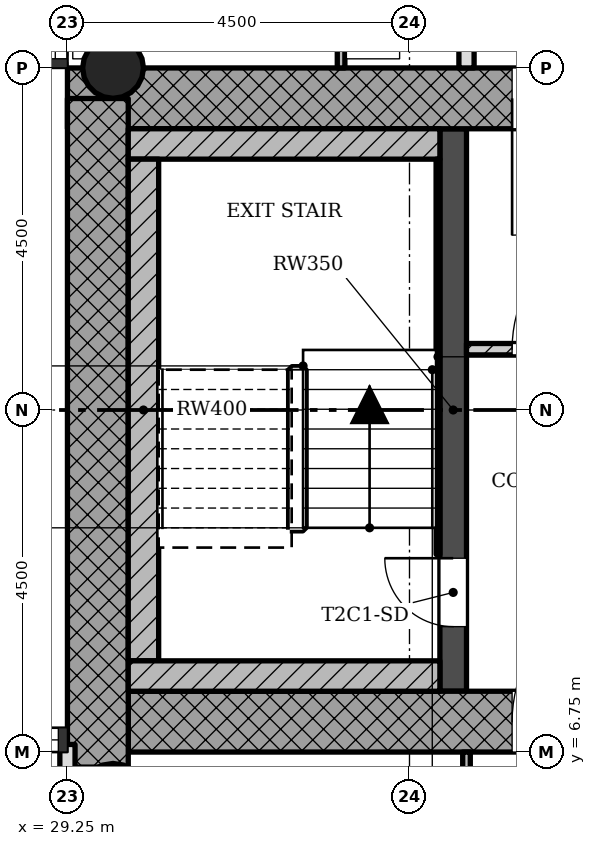
"""IFC4 building model, lengths in metres.
Left out: names, types, materials, properties, quantities, classifications, styles, units other than length and angle.
Written with IfcOpenShell. Run it as: python <this file> out.ifc"""

import sys

from ifc_helpers import new_model, si_unit, direction, frame, frame_2d, origin, origin_2d, place, context, subcontext, project, spatial, rectangle, hollow_circle, extrude, element, fill, save


model = new_model("IFC4")
c1 = context("Model", 3, precision=1e-05, world=origin(), true_north=direction((0.0, 1.0)))
c2 = subcontext(c1, "Body", "Model", "MODEL_VIEW")
j1 = project(units=[si_unit("LENGTHUNIT", "METRE"), si_unit("PLANEANGLEUNIT", "RADIAN")], contexts=[c1])
p1 = place(None, origin())
s1 = spatial("IfcSite", under=j1, at=p1, CompositionType="ELEMENT")
p2 = place(p1, origin())
s2 = spatial("IfcBuilding", under=s1, at=p2, CompositionType="ELEMENT")
p3 = place(p2, frame((0.0, 0.0, 171.1)))
s3 = spatial("IfcBuildingStorey", under=s2, at=p3, CompositionType="ELEMENT", Elevation=171.1)
p4 = place(p3, frame((30.05, 7.15, 0.0), z_axis=(0.0, 0.0, 1.0), x_axis=(1.0, 0.0, 0.0)))
e1 = element("IfcWall", 1, at=p4, inside=s3, PredefinedType="SHEAR", context=c2, shape_type="SweptSolid", body=[
    extrude(rectangle(XDim=12.7, YDim=0.8, at=frame_2d((6.35, 0.0))), origin(), (0.0, 0.0, 1.0), 3.4),
])
p5 = place(p4, frame((5.05, 0.0, 0.0)))
e2 = element("IfcOpeningElement", 2, at=p5, cuts=e1, PredefinedType="OPENING", context=c2, shape_type="SweptSolid", body=[
    extrude(rectangle(XDim=1.8, YDim=2.1, at=frame_2d((0.9, 1.05))), frame((0.0, 0.41, 0.0), z_axis=(0.0, -1.0, 0.0), x_axis=(1.0, 0.0, 0.0)), (0.0, 0.0, 1.0), 0.82),
])
p6 = place(p3, frame((41.95, 15.35, 0.0), z_axis=(0.0, 0.0, 1.0), x_axis=(-1.0, 0.0, 0.0)))
e3 = element("IfcWall", 3, at=p6, inside=s3, PredefinedType="SHEAR", context=c2, shape_type="SweptSolid", body=[
    extrude(rectangle(XDim=12.7, YDim=0.8, at=frame_2d((6.35, 0.0))), origin(), (0.0, 0.0, 1.0), 3.4),
])
p7 = place(p6, frame((5.05, 0.0, 0.0)))
e4 = element("IfcOpeningElement", 4, at=p7, cuts=e3, PredefinedType="OPENING", context=c2, shape_type="SweptSolid", body=[
    extrude(rectangle(XDim=1.8, YDim=2.1, at=frame_2d((0.9, 1.05))), frame((0.0, 0.41, 0.0), z_axis=(0.0, -1.0, 0.0), x_axis=(1.0, 0.0, 0.0)), (0.0, 0.0, 1.0), 0.82),
])
p8 = place(p3, frame((29.65, 15.348, 0.0), z_axis=(0.0, 0.0, 1.0), x_axis=(0.0, -1.0, 0.0)))
e5 = element("IfcWall", 5, at=p8, inside=s3, PredefinedType="SHEAR", context=c2, shape_type="SweptSolid", body=[
    extrude(rectangle(XDim=8.796, YDim=0.8, at=frame_2d((4.398, 0.0))), origin(), (0.0, 0.0, 1.0), 3.4),
])
p9 = place(p3, frame((34.325, 7.55, 0.0), z_axis=(0.0, 0.0, 1.0), x_axis=(0.0, 1.0, 0.0)))
e6 = element("IfcWall", 6, at=p9, inside=s3, PredefinedType="SHEAR", context=c2, shape_type="SweptSolid", body=[
    extrude(rectangle(XDim=7.4, YDim=0.35, at=frame_2d((3.7, 0.0))), origin(), (0.0, 0.0, 1.0), 3.4),
])
p10 = place(p9, frame((0.85, 0.0, 0.0)))
e7 = element("IfcOpeningElement", 7, at=p10, cuts=e6, PredefinedType="OPENING", context=c2, shape_type="SweptSolid", body=[
    extrude(rectangle(XDim=0.9, YDim=2.1, at=frame_2d((0.45, 1.05))), frame((0.0, 0.185, 0.0), z_axis=(0.0, -1.0, 0.0), x_axis=(1.0, 0.0, 0.0)), (0.0, 0.0, 1.0), 0.37),
])
p11 = place(p3, frame((29.85, 15.75, 0.0), z_axis=(0.0, 0.0, 1.0), x_axis=(1.0, 0.0, 0.0)))
e8 = element("IfcColumn", 8, at=p11, inside=s3, PredefinedType="COLUMN", context=c2, shape_type="SweptSolid", body=[
    extrude(hollow_circle(Radius=0.4, WallThickness=0.028, at=origin_2d()), origin(), (0.0, 0.0, 1.0), 3.4),
])
p12 = place(p3, frame((29.85, 6.15, 0.0), z_axis=(0.0, 0.0, 1.0), x_axis=(1.0, 0.0, 0.0)))
e9 = element("IfcColumn", 9, at=p12, inside=s3, PredefinedType="COLUMN", context=c2, shape_type="SweptSolid", body=[
    extrude(hollow_circle(Radius=0.45, WallThickness=0.032, at=origin_2d()), origin(), (0.0, 0.0, 1.0), 3.4),
])
p13 = place(p3, frame((37.5, 12.05, 0.0), z_axis=(0.0, 0.0, 1.0), x_axis=(-1.0, 0.0, 0.0)))
e10 = element("IfcWall", 10, at=p13, inside=s3, PredefinedType="PARTITIONING", context=c2, shape_type="SweptSolid", body=[
    extrude(rectangle(XDim=3.0, YDim=0.15, at=frame_2d((1.5, 0.0))), origin(), (0.0, 0.0, 1.0), 3.0),
])
p14 = place(p13, frame((0.6, 0.0, 0.0)))
e11 = element("IfcOpeningElement", 11, at=p14, cuts=e10, PredefinedType="OPENING", context=c2, shape_type="SweptSolid", body=[
    extrude(rectangle(XDim=1.8, YDim=2.1, at=frame_2d((0.9, 1.05))), frame((0.0, 0.085, 0.0), z_axis=(0.0, -1.0, 0.0), x_axis=(1.0, 0.0, 0.0)), (0.0, 0.0, 1.0), 0.17),
])
p15 = place(p3, frame((34.5, 4.5, 0.0), z_axis=(0.0, 0.0, 1.0), x_axis=(0.0, 1.0, 0.0)))
e12 = element("IfcWall", 12, at=p15, inside=s3, PredefinedType="PARTITIONING", context=c2, shape_type="SweptSolid", body=[
    extrude(rectangle(XDim=2.25, YDim=0.1, at=frame_2d((1.125, 0.0))), origin(), (0.0, 0.0, 1.0), 3.0),
])
p16 = place(p3, frame((34.5, 15.75, 0.0), z_axis=(0.0, 0.0, 1.0), x_axis=(0.0, 1.0, 0.0)))
e13 = element("IfcWall", 13, at=p16, inside=s3, PredefinedType="SOLIDWALL", context=c2, shape_type="SweptSolid", body=[
    extrude(rectangle(XDim=4.5, YDim=0.2, at=frame_2d((2.25, 0.0))), origin(), (0.0, 0.0, 1.0), 3.0),
])
p17 = place(p16, frame((3.0, 0.0, 0.0)))
e14 = element("IfcOpeningElement", 14, at=p17, cuts=e13, PredefinedType="OPENING", context=c2, shape_type="SweptSolid", body=[
    extrude(rectangle(XDim=0.9, YDim=2.1, at=frame_2d((0.45, 1.05))), frame((0.0, 0.11, 0.0), z_axis=(0.0, -1.0, 0.0), x_axis=(1.0, 0.0, 0.0)), (0.0, 0.0, 1.0), 0.22),
])
p18 = place(p3, frame((32.85, 15.75, 0.0), z_axis=(0.0, 0.0, 1.0), x_axis=(0.0, 1.0, 0.0)))
e15 = element("IfcWall", 15, at=p18, inside=s3, PredefinedType="PARTITIONING", context=c2, shape_type="SweptSolid", body=[
    extrude(rectangle(XDim=4.5, YDim=0.1, at=frame_2d((2.25, 0.0))), origin(), (0.0, 0.0, 1.0), 3.0),
])
p19 = place(p18, frame((3.0, 0.0, 0.0)))
e16 = element("IfcOpeningElement", 16, at=p19, cuts=e15, PredefinedType="OPENING", context=c2, shape_type="SweptSolid", body=[
    extrude(rectangle(XDim=0.9, YDim=2.1, at=frame_2d((0.45, 1.05))), frame((0.0, 0.06, 0.0), z_axis=(0.0, -1.0, 0.0), x_axis=(1.0, 0.0, 0.0)), (0.0, 0.0, 1.0), 0.12),
])
p20 = place(p3, frame((29.25, 0.9, 0.0), z_axis=(0.0, 0.0, 1.0), x_axis=(0.0, 1.0, 0.0)))
e17 = element("IfcWall", 17, at=p20, inside=s3, PredefinedType="SOLIDWALL", context=c2, shape_type="SweptSolid", body=[
    extrude(rectangle(XDim=5.95, YDim=0.2, at=frame_2d((2.975, 0.0))), origin(), (0.0, 0.0, 1.0), 3.0),
])
p21 = place(p3, frame((34.15, 14.75, 0.0), z_axis=(0.0, 0.0, 1.0), x_axis=(-1.0, 0.0, 0.0)))
e18 = element("IfcWall", 18, at=p21, inside=s3, PredefinedType="SHEAR", context=c2, shape_type="SweptSolid", body=[
    extrude(rectangle(XDim=4.1, YDim=0.4, at=frame_2d((2.05, 0.0))), origin(), (0.0, 0.0, 1.0), 3.4),
])
p22 = place(p3, frame((30.25, 7.95, 0.0), z_axis=(0.0, 0.0, 1.0), x_axis=(0.0, 1.0, 0.0)))
e19 = element("IfcWall", 19, at=p22, inside=s3, PredefinedType="SHEAR", context=c2, shape_type="SweptSolid", body=[
    extrude(rectangle(XDim=6.6, YDim=0.4, at=frame_2d((3.3, 0.0))), origin(), (0.0, 0.0, 1.0), 3.4),
])
p23 = place(p3, frame((34.15, 7.75, 0.0), z_axis=(0.0, 0.0, 1.0), x_axis=(-1.0, 0.0, 0.0)))
e20 = element("IfcWall", 20, at=p23, inside=s3, PredefinedType="SHEAR", context=c2, shape_type="SweptSolid", body=[
    extrude(rectangle(XDim=4.1, YDim=0.4, at=frame_2d((2.05, 0.0))), origin(), (0.0, 0.0, 1.0), 3.4),
])
p24 = place(p3, frame((34.125, 9.35, 0.0), z_axis=(0.0, 0.0, 1.0), x_axis=(0.0, 1.0, 0.0)))
e21 = element("IfcWall", 21, at=p24, inside=s3, PredefinedType="SHEAR", context=c2, shape_type="SweptSolid", body=[
    extrude(rectangle(XDim=5.2, YDim=0.05, at=frame_2d((2.6, 0.0))), origin(), (0.0, 0.0, 1.0), 3.4),
])
p25 = place(p14, origin())
e22 = element("IfcDoor", 22, at=p25, inside=s3, OperationType="SINGLE_SWING_LEFT", PredefinedType="DOOR", context=c2, shape_type="SweptSolid", body=[
    extrude(rectangle(XDim=1.8, YDim=2.1, at=frame_2d((0.9, 1.05))), frame((0.0, 0.025, 0.0), z_axis=(0.0, -1.0, 0.0), x_axis=(1.0, 0.0, 0.0)), (0.0, 0.0, 1.0), 0.05),
])
fill(e11, e22)
p26 = place(p10, origin())
e23 = element("IfcDoor", 23, at=p26, inside=s3, OperationType="SINGLE_SWING_LEFT", PredefinedType="DOOR", context=c2, shape_type="SweptSolid", body=[
    extrude(rectangle(XDim=0.9, YDim=2.1, at=frame_2d((0.45, 1.05))), frame((0.0, 0.025, 0.0), z_axis=(0.0, -1.0, 0.0), x_axis=(1.0, 0.0, 0.0)), (0.0, 0.0, 1.0), 0.05),
])
fill(e7, e23)
p27 = place(p5, origin())
e24 = element("IfcDoor", 24, at=p27, inside=s3, OperationType="SINGLE_SWING_LEFT", PredefinedType="DOOR", context=c2, shape_type="SweptSolid", body=[
    extrude(rectangle(XDim=1.8, YDim=2.1, at=frame_2d((0.9, 1.05))), frame((0.0, 0.025, 0.0), z_axis=(0.0, -1.0, 0.0), x_axis=(1.0, 0.0, 0.0)), (0.0, 0.0, 1.0), 0.05),
])
fill(e2, e24)
p28 = place(p7, origin())
e25 = element("IfcDoor", 25, at=p28, inside=s3, OperationType="SINGLE_SWING_LEFT", PredefinedType="DOOR", context=c2, shape_type="SweptSolid", body=[
    extrude(rectangle(XDim=1.8, YDim=2.1, at=frame_2d((0.9, 1.05))), frame((0.0, 0.025, 0.0), z_axis=(0.0, -1.0, 0.0), x_axis=(1.0, 0.0, 0.0)), (0.0, 0.0, 1.0), 0.05),
])
fill(e4, e25)
save(model, sys.argv[1])
